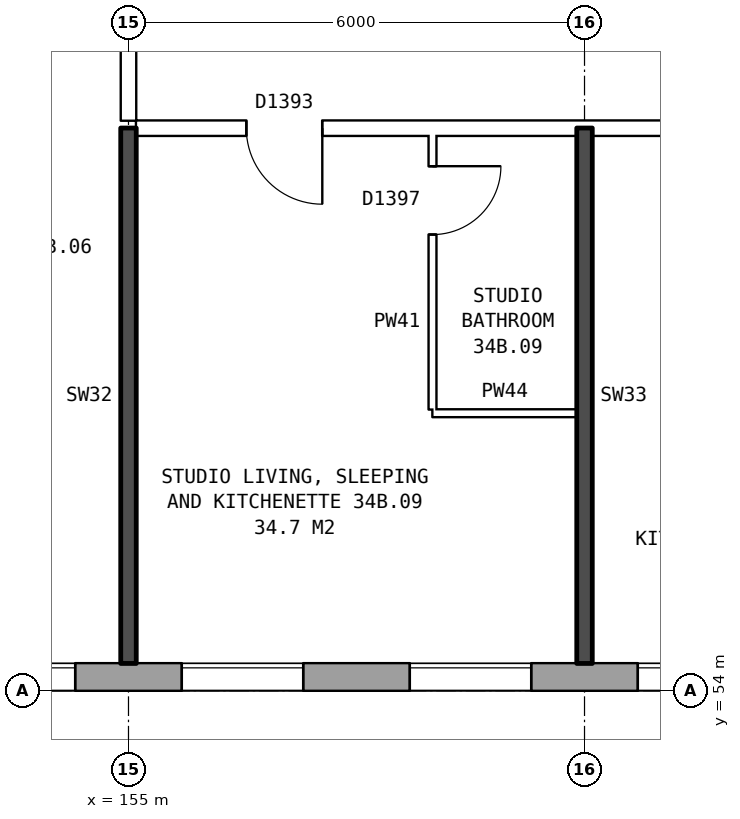
"""IFC4 building model, lengths in metres.
Left out: names, types, materials, properties, quantities, classifications, styles, units other than length and angle.
Written with IfcOpenShell. Run it as: python <this file> out.ifc"""

import sys

from ifc_helpers import new_model, si_unit, direction, frame, frame_2d, origin, place, context, subcontext, project, spatial, rectangle, extrude, element, fill, save


model = new_model("IFC4")
c1 = context("Model", 3, precision=1e-05, world=origin(), true_north=direction((0.0, 1.0)))
c2 = subcontext(c1, "Body", "Model", "MODEL_VIEW")
j1 = project(units=[si_unit("LENGTHUNIT", "METRE"), si_unit("PLANEANGLEUNIT", "RADIAN")], contexts=[c1])
p1 = place(None, origin())
s1 = spatial("IfcSite", under=j1, at=p1, CompositionType="ELEMENT")
p2 = place(p1, origin())
s2 = spatial("IfcBuilding", under=s1, at=p2, CompositionType="ELEMENT")
p3 = place(p2, frame((0.0, 0.0, 123.7)))
s3 = spatial("IfcBuildingStorey", under=s2, at=p3, CompositionType="ELEMENT", Elevation=123.7)
p4 = place(p3, frame((134.075, 54.18, 0.0), z_axis=(0.0, 0.0, 1.0), x_axis=(1.0, 0.0, 0.0)))
e1 = element("IfcWall", 1, at=p4, inside=s3, PredefinedType="STANDARD", context=c2, shape_type="SweptSolid", body=[
    extrude(rectangle(XDim=35.601, YDim=0.36, at=frame_2d((17.8, 0.0))), origin(), (0.0, 0.0, 1.0), 2.85),
])
p5 = place(p4, frame((0.3, 0.0, 0.8)))
e2 = element("IfcOpeningElement", 2, at=p5, cuts=e1, PredefinedType="OPENING", context=c2, shape_type="SweptSolid", body=[
    extrude(rectangle(XDim=0.8, YDim=1.8, at=frame_2d((0.4, 0.9))), frame((0.0, 0.19, 0.0), z_axis=(0.0, -1.0, 0.0), x_axis=(1.0, 0.0, 0.0)), (0.0, 0.0, 1.0), 0.38),
])
p6 = place(p4, frame((3.425, 0.0, 0.8)))
e3 = element("IfcOpeningElement", 3, at=p6, cuts=e1, PredefinedType="OPENING", context=c2, shape_type="SweptSolid", body=[
    extrude(rectangle(XDim=1.0, YDim=1.2, at=frame_2d((0.5, 0.6))), frame((0.0, 0.19, 0.0), z_axis=(0.0, -1.0, 0.0), x_axis=(1.0, 0.0, 0.0)), (0.0, 0.0, 1.0), 0.38),
])
p7 = place(p4, frame((6.625, 0.0, 0.8)))
e4 = element("IfcOpeningElement", 4, at=p7, cuts=e1, PredefinedType="OPENING", context=c2, shape_type="SweptSolid", body=[
    extrude(rectangle(XDim=1.6, YDim=1.8, at=frame_2d((0.8, 0.9))), frame((0.0, 0.19, 0.0), z_axis=(0.0, -1.0, 0.0), x_axis=(1.0, 0.0, 0.0)), (0.0, 0.0, 1.0), 0.38),
])
p8 = place(p4, frame((9.625, 0.0, 0.8)))
e5 = element("IfcOpeningElement", 5, at=p8, cuts=e1, PredefinedType="OPENING", context=c2, shape_type="SweptSolid", body=[
    extrude(rectangle(XDim=1.6, YDim=1.8, at=frame_2d((0.8, 0.9))), frame((0.0, 0.19, 0.0), z_axis=(0.0, -1.0, 0.0), x_axis=(1.0, 0.0, 0.0)), (0.0, 0.0, 1.0), 0.38),
])
p9 = place(p4, frame((12.625, 0.0, 0.8)))
e6 = element("IfcOpeningElement", 6, at=p9, cuts=e1, PredefinedType="OPENING", context=c2, shape_type="SweptSolid", body=[
    extrude(rectangle(XDim=1.6, YDim=1.8, at=frame_2d((0.8, 0.9))), frame((0.0, 0.19, 0.0), z_axis=(0.0, -1.0, 0.0), x_axis=(1.0, 0.0, 0.0)), (0.0, 0.0, 1.0), 0.38),
])
p10 = place(p4, frame((15.625, 0.0, 0.8)))
e7 = element("IfcOpeningElement", 7, at=p10, cuts=e1, PredefinedType="OPENING", context=c2, shape_type="SweptSolid", body=[
    extrude(rectangle(XDim=1.6, YDim=1.8, at=frame_2d((0.8, 0.9))), frame((0.0, 0.19, 0.0), z_axis=(0.0, -1.0, 0.0), x_axis=(1.0, 0.0, 0.0)), (0.0, 0.0, 1.0), 0.38),
])
p11 = place(p4, frame((18.625, 0.0, 0.8)))
e8 = element("IfcOpeningElement", 8, at=p11, cuts=e1, PredefinedType="OPENING", context=c2, shape_type="SweptSolid", body=[
    extrude(rectangle(XDim=1.6, YDim=1.8, at=frame_2d((0.8, 0.9))), frame((0.0, 0.19, 0.0), z_axis=(0.0, -1.0, 0.0), x_axis=(1.0, 0.0, 0.0)), (0.0, 0.0, 1.0), 0.38),
])
p12 = place(p4, frame((21.625, 0.0, 0.8)))
e9 = element("IfcOpeningElement", 9, at=p12, cuts=e1, PredefinedType="OPENING", context=c2, shape_type="SweptSolid", body=[
    extrude(rectangle(XDim=1.6, YDim=1.8, at=frame_2d((0.8, 0.9))), frame((0.0, 0.19, 0.0), z_axis=(0.0, -1.0, 0.0), x_axis=(1.0, 0.0, 0.0)), (0.0, 0.0, 1.0), 0.38),
])
p13 = place(p4, frame((24.625, 0.0, 0.8)))
e10 = element("IfcOpeningElement", 10, at=p13, cuts=e1, PredefinedType="OPENING", context=c2, shape_type="SweptSolid", body=[
    extrude(rectangle(XDim=1.6, YDim=1.8, at=frame_2d((0.8, 0.9))), frame((0.0, 0.19, 0.0), z_axis=(0.0, -1.0, 0.0), x_axis=(1.0, 0.0, 0.0)), (0.0, 0.0, 1.0), 0.38),
])
p14 = place(p4, frame((27.625, 0.0, 0.8)))
e11 = element("IfcOpeningElement", 11, at=p14, cuts=e1, PredefinedType="OPENING", context=c2, shape_type="SweptSolid", body=[
    extrude(rectangle(XDim=1.6, YDim=1.8, at=frame_2d((0.8, 0.9))), frame((0.0, 0.19, 0.0), z_axis=(0.0, -1.0, 0.0), x_axis=(1.0, 0.0, 0.0)), (0.0, 0.0, 1.0), 0.38),
])
p15 = place(p4, frame((29.525, 0.0, 0.8)))
e12 = element("IfcOpeningElement", 12, at=p15, cuts=e1, PredefinedType="OPENING", context=c2, shape_type="SweptSolid", body=[
    extrude(rectangle(XDim=1.6, YDim=1.8, at=frame_2d((0.8, 0.9))), frame((0.0, 0.19, 0.0), z_axis=(0.0, -1.0, 0.0), x_axis=(1.0, 0.0, 0.0)), (0.0, 0.0, 1.0), 0.38),
])
p16 = place(p4, frame((33.525, 0.0, 1.7)))
e13 = element("IfcOpeningElement", 13, at=p16, cuts=e1, PredefinedType="OPENING", context=c2, shape_type="SweptSolid", body=[
    extrude(rectangle(XDim=0.6, YDim=0.9, at=frame_2d((0.3, 0.45))), frame((0.0, 0.19, 0.0), z_axis=(0.0, -1.0, 0.0), x_axis=(1.0, 0.0, 0.0)), (0.0, 0.0, 1.0), 0.38),
])
p17 = place(p4, frame((1.4, 0.0, 1.6)))
e14 = element("IfcOpeningElement", 14, at=p17, cuts=e1, PredefinedType="OPENING", context=c2, shape_type="SweptSolid", body=[
    extrude(rectangle(XDim=0.6, YDim=0.9, at=frame_2d((0.3, 0.45))), frame((0.0, 0.19, 0.0), z_axis=(0.0, -1.0, 0.0), x_axis=(1.0, 0.0, 0.0)), (0.0, 0.0, 1.0), 0.38),
])
p18 = place(p4, frame((4.725, 0.0, 0.8)))
e15 = element("IfcOpeningElement", 15, at=p18, cuts=e1, PredefinedType="OPENING", context=c2, shape_type="SweptSolid", body=[
    extrude(rectangle(XDim=1.4, YDim=1.8, at=frame_2d((0.7, 0.9))), frame((0.0, 0.19, 0.0), z_axis=(0.0, -1.0, 0.0), x_axis=(1.0, 0.0, 0.0)), (0.0, 0.0, 1.0), 0.38),
])
p19 = place(p4, frame((31.425, 0.0, 0.8)))
e16 = element("IfcOpeningElement", 16, at=p19, cuts=e1, PredefinedType="OPENING", context=c2, shape_type="SweptSolid", body=[
    extrude(rectangle(XDim=0.6, YDim=1.2, at=frame_2d((0.3, 0.6))), frame((0.0, 0.19, 0.0), z_axis=(0.0, -1.0, 0.0), x_axis=(1.0, 0.0, 0.0)), (0.0, 0.0, 1.0), 0.38),
])
p20 = place(p4, frame((34.425, 0.0, 0.8)))
e17 = element("IfcOpeningElement", 17, at=p20, cuts=e1, PredefinedType="OPENING", context=c2, shape_type="SweptSolid", body=[
    extrude(rectangle(XDim=0.8, YDim=1.8, at=frame_2d((0.4, 0.9))), frame((0.0, 0.19, 0.0), z_axis=(0.0, -1.0, 0.0), x_axis=(1.0, 0.0, 0.0)), (0.0, 0.0, 1.0), 0.38),
])
p21 = place(p3, frame((159.0, 57.65, 0.0), z_axis=(0.0, 0.0, 1.0), x_axis=(1.0, 0.0, 0.0)))
e18 = element("IfcWall", 18, at=p21, inside=s3, PredefinedType="PARTITIONING", context=c2, shape_type="SweptSolid", body=[
    extrude(rectangle(XDim=1.9, YDim=0.1, at=frame_2d((0.95, 0.0))), origin(), (0.0, 0.0, 1.0), 2.85),
])
p22 = place(p3, frame((155.1, 61.4, 0.0), z_axis=(0.0, 0.0, 1.0), x_axis=(1.0, 0.0, 0.0)))
e19 = element("IfcWall", 19, at=p22, inside=s3, PredefinedType="PARTITIONING", context=c2, shape_type="SweptSolid", body=[
    extrude(rectangle(XDim=17.29, YDim=0.2, at=frame_2d((8.645, 0.0))), origin(), (0.0, 0.0, 1.0), 2.85),
])
p23 = place(p22, frame((1.45, 0.0, 0.0)))
e20 = element("IfcOpeningElement", 20, at=p23, cuts=e19, PredefinedType="OPENING", context=c2, shape_type="SweptSolid", body=[
    extrude(rectangle(XDim=1.0, YDim=2.1, at=frame_2d((0.5, 1.05))), frame((0.0, 0.11, 0.0), z_axis=(0.0, -1.0, 0.0), x_axis=(1.0, 0.0, 0.0)), (0.0, 0.0, 1.0), 0.22),
])
p24 = place(p22, frame((8.4, 0.0, 0.0)))
e21 = element("IfcOpeningElement", 21, at=p24, cuts=e19, PredefinedType="OPENING", context=c2, shape_type="SweptSolid", body=[
    extrude(rectangle(XDim=1.0, YDim=2.1, at=frame_2d((0.5, 1.05))), frame((0.0, 0.11, 0.0), z_axis=(0.0, -1.0, 0.0), x_axis=(1.0, 0.0, 0.0)), (0.0, 0.0, 1.0), 0.22),
])
p25 = place(p3, frame((155.0, 54.36, 0.0), z_axis=(0.0, 0.0, 1.0), x_axis=(0.0, 1.0, 0.0)))
e22 = element("IfcWall", 22, at=p25, inside=s3, PredefinedType="SOLIDWALL", context=c2, shape_type="SweptSolid", body=[
    extrude(rectangle(XDim=7.04, YDim=0.2, at=frame_2d((3.52, 0.0))), origin(), (0.0, 0.0, 1.0), 2.85),
])
p26 = place(p3, frame((155.0, 61.5, 0.0), z_axis=(0.0, 0.0, 1.0), x_axis=(0.0, 1.0, 0.0)))
e23 = element("IfcWall", 23, at=p26, inside=s3, PredefinedType="PARTITIONING", context=c2, shape_type="SweptSolid", body=[
    extrude(rectangle(XDim=2.2, YDim=0.2, at=frame_2d((1.1, 0.0))), origin(), (0.0, 0.0, 1.0), 2.85),
])
p27 = place(p3, frame((159.0, 57.7, 0.0), z_axis=(0.0, 0.0, 1.0), x_axis=(0.0, 1.0, 0.0)))
e24 = element("IfcWall", 24, at=p27, inside=s3, PredefinedType="PARTITIONING", context=c2, shape_type="SweptSolid", body=[
    extrude(rectangle(XDim=3.6, YDim=0.1, at=frame_2d((1.8, 0.0))), origin(), (0.0, 0.0, 1.0), 2.85),
])
p28 = place(p27, frame((2.3, 0.0, 0.0)))
e25 = element("IfcOpeningElement", 25, at=p28, cuts=e24, PredefinedType="OPENING", context=c2, shape_type="SweptSolid", body=[
    extrude(rectangle(XDim=0.9, YDim=2.1, at=frame_2d((0.45, 1.05))), frame((0.0, 0.06, 0.0), z_axis=(0.0, -1.0, 0.0), x_axis=(1.0, 0.0, 0.0)), (0.0, 0.0, 1.0), 0.12),
])
p29 = place(p3, frame((161.0, 54.36, 0.0), z_axis=(0.0, 0.0, 1.0), x_axis=(0.0, 1.0, 0.0)))
e26 = element("IfcWall", 26, at=p29, inside=s3, PredefinedType="SOLIDWALL", context=c2, shape_type="SweptSolid", body=[
    extrude(rectangle(XDim=7.04, YDim=0.2, at=frame_2d((3.52, 0.0))), origin(), (0.0, 0.0, 1.0), 2.85),
])
p30 = place(p11, origin())
e27 = element("IfcWindow", 27, at=p30, inside=s3, PartitioningType="SINGLE_PANEL", PredefinedType="WINDOW", context=c2, shape_type="SweptSolid", body=[
    extrude(rectangle(XDim=1.6, YDim=1.8, at=frame_2d((0.8, 0.9))), frame((0.0, 0.15, 0.0), z_axis=(0.0, -1.0, 0.0), x_axis=(1.0, 0.0, 0.0)), (0.0, 0.0, 1.0), 0.06),
])
fill(e8, e27)
p31 = place(p12, origin())
e28 = element("IfcWindow", 28, at=p31, inside=s3, PartitioningType="SINGLE_PANEL", PredefinedType="WINDOW", context=c2, shape_type="SweptSolid", body=[
    extrude(rectangle(XDim=1.6, YDim=1.8, at=frame_2d((0.8, 0.9))), frame((0.0, 0.15, 0.0), z_axis=(0.0, -1.0, 0.0), x_axis=(1.0, 0.0, 0.0)), (0.0, 0.0, 1.0), 0.06),
])
fill(e9, e28)
p32 = place(p13, origin())
e29 = element("IfcWindow", 29, at=p32, inside=s3, PartitioningType="SINGLE_PANEL", PredefinedType="WINDOW", context=c2, shape_type="SweptSolid", body=[
    extrude(rectangle(XDim=1.6, YDim=1.8, at=frame_2d((0.8, 0.9))), frame((0.0, 0.15, 0.0), z_axis=(0.0, -1.0, 0.0), x_axis=(1.0, 0.0, 0.0)), (0.0, 0.0, 1.0), 0.06),
])
fill(e10, e29)
p33 = place(p14, origin())
e30 = element("IfcWindow", 30, at=p33, inside=s3, PartitioningType="SINGLE_PANEL", PredefinedType="WINDOW", context=c2, shape_type="SweptSolid", body=[
    extrude(rectangle(XDim=1.6, YDim=1.8, at=frame_2d((0.8, 0.9))), frame((0.0, 0.15, 0.0), z_axis=(0.0, -1.0, 0.0), x_axis=(1.0, 0.0, 0.0)), (0.0, 0.0, 1.0), 0.06),
])
fill(e11, e30)
p34 = place(p23, frame((1.0, 0.0, 0.0), z_axis=(0.0, 0.0, 1.0), x_axis=(-1.0, 0.0, 0.0)))
e31 = element("IfcDoor", 31, at=p34, inside=s3, OperationType="SINGLE_SWING_LEFT", PredefinedType="DOOR", context=c2, shape_type="SweptSolid", body=[
    extrude(rectangle(XDim=1.0, YDim=2.1, at=frame_2d((0.5, 1.05))), frame((0.0, 0.025, 0.0), z_axis=(0.0, -1.0, 0.0), x_axis=(1.0, 0.0, 0.0)), (0.0, 0.0, 1.0), 0.05),
])
fill(e20, e31)
p35 = place(p28, frame((0.9, 0.0, 0.0), z_axis=(0.0, 0.0, 1.0), x_axis=(-1.0, 0.0, 0.0)))
e32 = element("IfcDoor", 32, at=p35, inside=s3, OperationType="SINGLE_SWING_LEFT", PredefinedType="DOOR", context=c2, shape_type="SweptSolid", body=[
    extrude(rectangle(XDim=0.9, YDim=2.1, at=frame_2d((0.45, 1.05))), frame((0.0, 0.025, 0.0), z_axis=(0.0, -1.0, 0.0), x_axis=(1.0, 0.0, 0.0)), (0.0, 0.0, 1.0), 0.05),
])
fill(e25, e32)
save(model, sys.argv[1])
